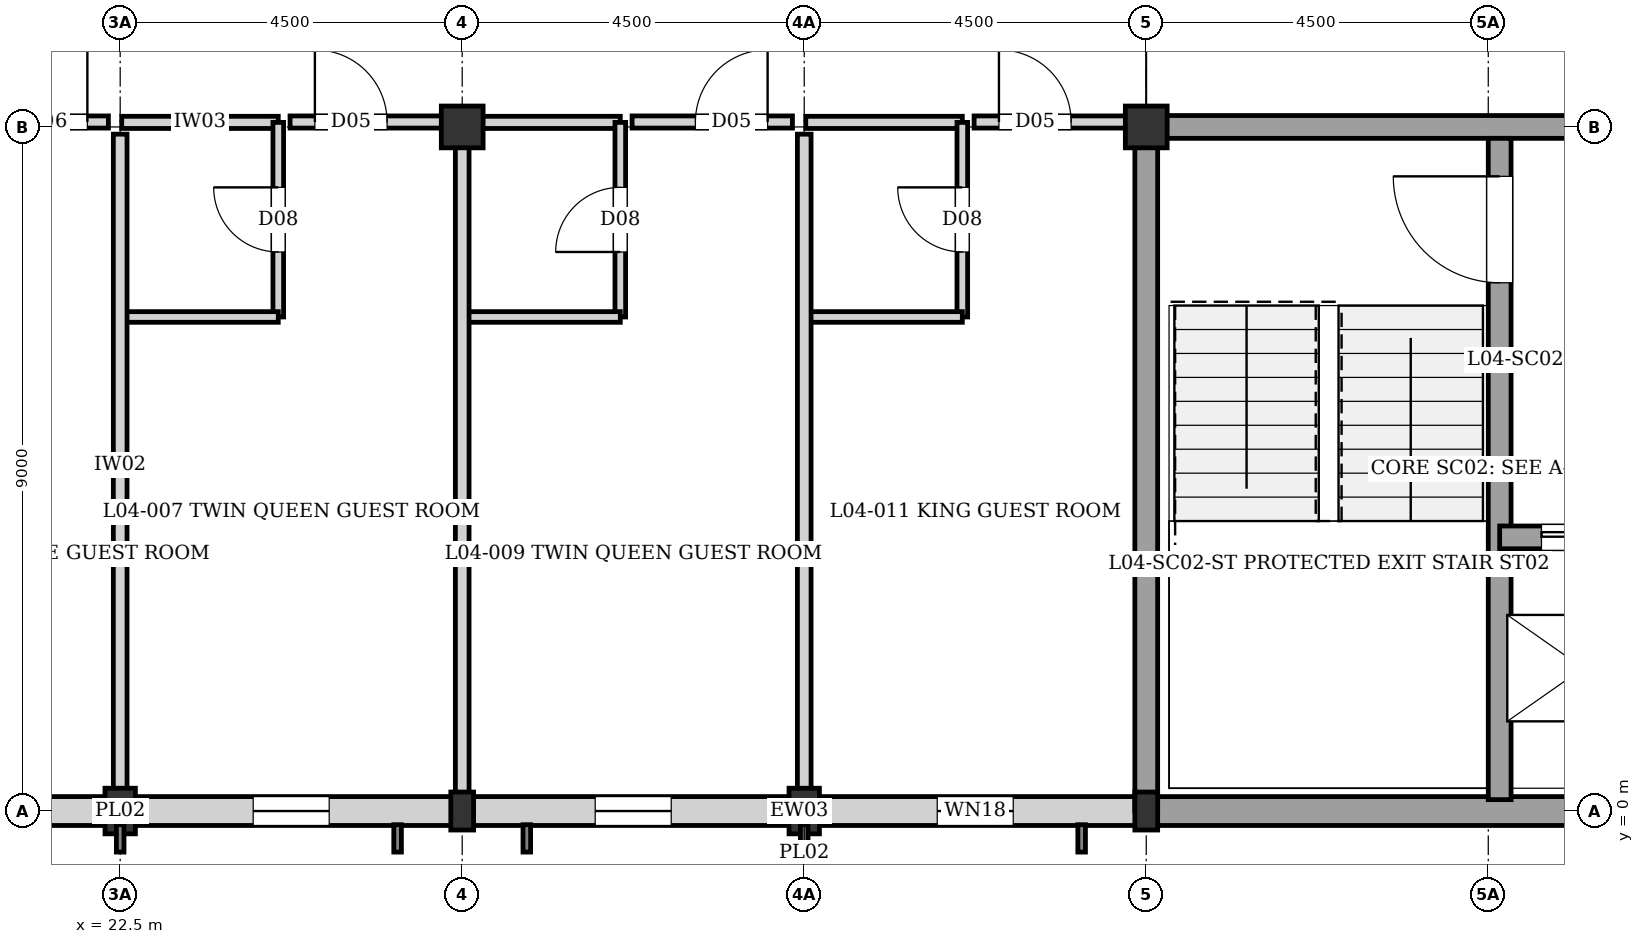
"""IFC4 building model, lengths in metres.
Left out: names, types, materials, properties, quantities, classifications, styles, units other than length and angle.
Written with IfcOpenShell. Run it as: python <this file> out.ifc"""

import sys

from ifc_helpers import new_model, si_unit, direction, frame, frame_2d, origin, origin_2d, place, context, subcontext, project, spatial, rectangle, i_section, extrude, element, fill, save


model = new_model("IFC4")
c1 = context("Model", 3, precision=1e-05, world=origin(), true_north=direction((0.0, 1.0)))
c2 = subcontext(c1, "Body", "Model", "MODEL_VIEW")
j1 = project(units=[si_unit("LENGTHUNIT", "METRE"), si_unit("PLANEANGLEUNIT", "RADIAN")], contexts=[c1])
p1 = place(None, origin())
s1 = spatial("IfcSite", under=j1, at=p1, CompositionType="ELEMENT")
p2 = place(p1, origin())
s2 = spatial("IfcBuilding", under=s1, at=p2, CompositionType="ELEMENT")
p3 = place(p2, frame((0.0, 0.0, 14.56)))
s3 = spatial("IfcBuildingStorey", under=s2, at=p3, CompositionType="ELEMENT", Elevation=14.56)
p4 = place(p3, frame((27.0, 0.0, 0.0), z_axis=(0.0, 0.0, 1.0), x_axis=(1.0, 0.0, 0.0)))
e1 = element("IfcColumn", 1, at=p4, inside=s3, PredefinedType="COLUMN", context=c2, shape_type="SweptSolid", body=[
    extrude(i_section(OverallWidth=0.3, OverallDepth=0.5, WebThickness=0.014, FlangeThickness=0.028, at=origin_2d()), origin(), (0.0, 0.0, 1.0), 3.04),
])
p5 = place(p3, frame((27.0, 9.0, 0.0), z_axis=(0.0, 0.0, 1.0), x_axis=(1.0, 0.0, 0.0)))
e2 = element("IfcColumn", 2, at=p5, inside=s3, PredefinedType="COLUMN", context=c2, shape_type="SweptSolid", body=[
    extrude(rectangle(XDim=0.55, YDim=0.55, at=origin_2d()), origin(), (0.0, 0.0, 1.0), 3.04),
])
p6 = place(p3, frame((36.0, 0.0, 0.0), z_axis=(0.0, 0.0, 1.0), x_axis=(1.0, 0.0, 0.0)))
e3 = element("IfcColumn", 3, at=p6, inside=s3, PredefinedType="COLUMN", context=c2, shape_type="SweptSolid", body=[
    extrude(i_section(OverallWidth=0.3, OverallDepth=0.5, WebThickness=0.014, FlangeThickness=0.028, at=origin_2d()), origin(), (0.0, 0.0, 1.0), 3.04),
])
p7 = place(p3, frame((36.0, 9.0, 0.0), z_axis=(0.0, 0.0, 1.0), x_axis=(1.0, 0.0, 0.0)))
e4 = element("IfcColumn", 4, at=p7, inside=s3, PredefinedType="COLUMN", context=c2, shape_type="SweptSolid", body=[
    extrude(rectangle(XDim=0.55, YDim=0.55, at=origin_2d()), origin(), (0.0, 0.0, 1.0), 3.04),
])
for number, where, z_axis, x_axis in (
    (5, (22.5, 0.0, 0.0), (0.0, 0.0, 1.0), (1.0, 0.0, 0.0)),
    (6, (31.5, 0.0, 0.0), (0.0, 0.0, 1.0), (1.0, 0.0, 0.0)),
):
    element("IfcColumn", number, at=place(p3, frame(where, z_axis=z_axis, x_axis=x_axis)), inside=s3, PredefinedType="PILASTER", context=c2, shape_type="SweptSolid", body=[
        extrude(rectangle(XDim=0.4, YDim=0.6, at=origin_2d()), origin(), (0.0, 0.0, 1.0), 3.04),
    ])
p8 = place(p3, frame((45.0, 0.0, 0.0), z_axis=(0.0, 0.0, 1.0), x_axis=(-1.0, 0.0, 0.0)))
e7 = element("IfcWall", 7, at=p8, inside=s3, PredefinedType="SOLIDWALL", context=c2, shape_type="SweptSolid", body=[
    extrude(rectangle(XDim=9.0, YDim=0.38, at=frame_2d((4.5, 0.0))), origin(), (0.0, 0.0, 1.0), 2.82),
])
p9 = place(p3, frame((35.87, 0.0, 0.0), z_axis=(0.0, 0.0, 1.0), x_axis=(-1.0, 0.0, 0.0)))
e8 = element("IfcWall", 8, at=p9, inside=s3, PredefinedType="SOLIDWALL", context=c2, shape_type="SweptSolid", body=[
    extrude(rectangle(XDim=8.87, YDim=0.38, at=frame_2d((4.435, 0.0))), origin(), (0.0, 0.0, 1.0), 2.48),
])
p10 = place(p9, frame((1.62, 0.0, 0.35)))
e9 = element("IfcOpeningElement", 9, at=p10, cuts=e8, PredefinedType="OPENING", context=c2, shape_type="SweptSolid", body=[
    extrude(rectangle(XDim=1.0, YDim=1.6, at=frame_2d((0.5, 0.8))), frame((0.0, 0.2, 0.0), z_axis=(0.0, -1.0, 0.0), x_axis=(1.0, 0.0, 0.0)), (0.0, 0.0, 1.0), 0.4),
])
p11 = place(p9, frame((6.12, 0.0, 0.35)))
e10 = element("IfcOpeningElement", 10, at=p11, cuts=e8, PredefinedType="OPENING", context=c2, shape_type="SweptSolid", body=[
    extrude(rectangle(XDim=1.0, YDim=1.6, at=frame_2d((0.5, 0.8))), frame((0.0, 0.2, 0.0), z_axis=(0.0, -1.0, 0.0), x_axis=(1.0, 0.0, 0.0)), (0.0, 0.0, 1.0), 0.4),
])
p12 = place(p3, frame((27.0, 0.0, 0.0), z_axis=(0.0, 0.0, 1.0), x_axis=(-1.0, 0.0, 0.0)))
e11 = element("IfcWall", 11, at=p12, inside=s3, PredefinedType="SOLIDWALL", context=c2, shape_type="SweptSolid", body=[
    extrude(rectangle(XDim=8.87, YDim=0.38, at=frame_2d((4.435, 0.0))), origin(), (0.0, 0.0, 1.0), 2.55),
])
p13 = place(p12, frame((1.75, 0.0, 0.35)))
e12 = element("IfcOpeningElement", 12, at=p13, cuts=e11, PredefinedType="OPENING", context=c2, shape_type="SweptSolid", body=[
    extrude(rectangle(XDim=1.0, YDim=1.6, at=frame_2d((0.5, 0.8))), frame((0.0, 0.2, 0.0), z_axis=(0.0, -1.0, 0.0), x_axis=(1.0, 0.0, 0.0)), (0.0, 0.0, 1.0), 0.4),
])
p14 = place(p12, frame((6.25, 0.0, 0.35)))
e13 = element("IfcOpeningElement", 13, at=p14, cuts=e11, PredefinedType="OPENING", context=c2, shape_type="SweptSolid", body=[
    extrude(rectangle(XDim=1.0, YDim=1.6, at=frame_2d((0.5, 0.8))), frame((0.0, 0.2, 0.0), z_axis=(0.0, -1.0, 0.0), x_axis=(1.0, 0.0, 0.0)), (0.0, 0.0, 1.0), 0.4),
])
p15 = place(p3, frame((36.0, 9.0, 0.0), z_axis=(0.0, 0.0, 1.0), x_axis=(1.0, 0.0, 0.0)))
e14 = element("IfcWall", 14, at=p15, inside=s3, PredefinedType="SHEAR", context=c2, shape_type="SweptSolid", body=[
    extrude(rectangle(XDim=9.0, YDim=0.3, at=frame_2d((4.5, 0.0))), origin(), (0.0, 0.0, 1.0), 2.82),
])
p16 = place(p15, frame((5.95, 0.0, 0.0)))
e15 = element("IfcOpeningElement", 15, at=p16, cuts=e14, PredefinedType="OPENING", context=c2, shape_type="SweptSolid", body=[
    extrude(rectangle(XDim=1.6, YDim=2.1, at=frame_2d((0.8, 1.05))), frame((0.0, 0.16, 0.0), z_axis=(0.0, -1.0, 0.0), x_axis=(1.0, 0.0, 0.0)), (0.0, 0.0, 1.0), 0.32),
])
p17 = place(p3, frame((36.0, 0.0, 0.0), z_axis=(0.0, 0.0, 1.0), x_axis=(0.0, 1.0, 0.0)))
e16 = element("IfcWall", 16, at=p17, inside=s3, PredefinedType="SHEAR", context=c2, shape_type="SweptSolid", body=[
    extrude(rectangle(XDim=9.0, YDim=0.3, at=frame_2d((4.5, 0.0))), origin(), (0.0, 0.0, 1.0), 2.82),
])
p18 = place(p3, frame((40.65, 0.15, 0.0), z_axis=(0.0, 0.0, 1.0), x_axis=(0.0, 1.0, 0.0)))
e17 = element("IfcWall", 17, at=p18, inside=s3, PredefinedType="SHEAR", context=c2, shape_type="SweptSolid", body=[
    extrude(rectangle(XDim=8.7, YDim=0.3, at=frame_2d((4.35, 0.0))), origin(), (0.0, 0.0, 1.0), 2.82),
])
p19 = place(p18, frame((6.8, 0.0, 0.0)))
e18 = element("IfcOpeningElement", 18, at=p19, cuts=e17, PredefinedType="OPENING", context=c2, shape_type="SweptSolid", body=[
    extrude(rectangle(XDim=1.4, YDim=2.02, at=frame_2d((0.7, 1.01))), frame((0.0, 0.16, 0.0), z_axis=(0.0, -1.0, 0.0), x_axis=(1.0, 0.0, 0.0)), (0.0, 0.0, 1.0), 0.32),
])
p20 = place(p3, frame((40.65, 3.6, 0.0), z_axis=(0.0, 0.0, 1.0), x_axis=(1.0, 0.0, 0.0)))
e19 = element("IfcWall", 19, at=p20, inside=s3, PredefinedType="SHEAR", context=c2, shape_type="SweptSolid", body=[
    extrude(rectangle(XDim=4.2, YDim=0.3, at=frame_2d((2.1, 0.0))), origin(), (0.0, 0.0, 1.0), 2.82),
])
p21 = place(p20, frame((0.55, 0.0, 0.0)))
e20 = element("IfcOpeningElement", 20, at=p21, cuts=e19, PredefinedType="OPENING", context=c2, shape_type="SweptSolid", body=[
    extrude(rectangle(XDim=1.1, YDim=2.1, at=frame_2d((0.55, 1.05))), frame((0.0, 0.16, 0.0), z_axis=(0.0, -1.0, 0.0), x_axis=(1.0, 0.0, 0.0)), (0.0, 0.0, 1.0), 0.32),
])
p22 = place(p20, frame((2.45, 0.0, 0.0)))
e21 = element("IfcOpeningElement", 21, at=p22, cuts=e19, PredefinedType="OPENING", context=c2, shape_type="SweptSolid", body=[
    extrude(rectangle(XDim=1.2, YDim=2.2, at=frame_2d((0.6, 1.1))), frame((0.0, 0.16, 0.0), z_axis=(0.0, -1.0, 0.0), x_axis=(1.0, 0.0, 0.0)), (0.0, 0.0, 1.0), 0.32),
])
p23 = place(p3, frame((22.52, 9.06, 0.0), z_axis=(0.0, 0.0, 1.0), x_axis=(1.0, 0.0, 0.0)))
e22 = element("IfcWall", 22, at=p23, inside=s3, PredefinedType="PARTITIONING", context=c2, shape_type="SweptSolid", body=[
    extrude(rectangle(XDim=2.06, YDim=0.16, at=frame_2d((1.03, 0.0))), origin(), (0.0, 0.0, 1.0), 2.39),
])
p24 = place(p3, frame((24.58, 6.5, 0.0), z_axis=(0.0, 0.0, 1.0), x_axis=(0.0, 1.0, 0.0)))
e23 = element("IfcWall", 23, at=p24, inside=s3, PredefinedType="PLUMBINGWALL", context=c2, shape_type="SweptSolid", body=[
    extrude(rectangle(XDim=2.56, YDim=0.14, at=frame_2d((1.28, 0.0))), origin(), (0.0, 0.0, 1.0), 2.82),
])
p25 = place(p24, frame((0.855, 0.0, 0.0)))
e24 = element("IfcOpeningElement", 24, at=p25, cuts=e23, PredefinedType="OPENING", context=c2, shape_type="SweptSolid", body=[
    extrude(rectangle(XDim=0.85, YDim=2.04, at=frame_2d((0.425, 1.02))), frame((0.0, 0.08, 0.0), z_axis=(0.0, -1.0, 0.0), x_axis=(1.0, 0.0, 0.0)), (0.0, 0.0, 1.0), 0.16),
])
p26 = place(p3, frame((22.52, 6.5, 0.0), z_axis=(0.0, 0.0, 1.0), x_axis=(1.0, 0.0, 0.0)))
e25 = element("IfcWall", 25, at=p26, inside=s3, PredefinedType="PLUMBINGWALL", context=c2, shape_type="SweptSolid", body=[
    extrude(rectangle(XDim=2.06, YDim=0.14, at=frame_2d((1.03, 0.0))), origin(), (0.0, 0.0, 1.0), 2.82),
])
p27 = place(p3, frame((27.02, 9.06, 0.0), z_axis=(0.0, 0.0, 1.0), x_axis=(1.0, 0.0, 0.0)))
e26 = element("IfcWall", 26, at=p27, inside=s3, PredefinedType="PARTITIONING", context=c2, shape_type="SweptSolid", body=[
    extrude(rectangle(XDim=2.06, YDim=0.16, at=frame_2d((1.03, 0.0))), origin(), (0.0, 0.0, 1.0), 2.34),
])
p28 = place(p3, frame((29.08, 6.5, 0.0), z_axis=(0.0, 0.0, 1.0), x_axis=(0.0, 1.0, 0.0)))
e27 = element("IfcWall", 27, at=p28, inside=s3, PredefinedType="PLUMBINGWALL", context=c2, shape_type="SweptSolid", body=[
    extrude(rectangle(XDim=2.56, YDim=0.14, at=frame_2d((1.28, 0.0))), origin(), (0.0, 0.0, 1.0), 2.82),
])
p29 = place(p28, frame((0.855, 0.0, 0.0)))
e28 = element("IfcOpeningElement", 28, at=p29, cuts=e27, PredefinedType="OPENING", context=c2, shape_type="SweptSolid", body=[
    extrude(rectangle(XDim=0.85, YDim=2.04, at=frame_2d((0.425, 1.02))), frame((0.0, 0.08, 0.0), z_axis=(0.0, -1.0, 0.0), x_axis=(1.0, 0.0, 0.0)), (0.0, 0.0, 1.0), 0.16),
])
p30 = place(p3, frame((27.02, 6.5, 0.0), z_axis=(0.0, 0.0, 1.0), x_axis=(1.0, 0.0, 0.0)))
e29 = element("IfcWall", 29, at=p30, inside=s3, PredefinedType="PLUMBINGWALL", context=c2, shape_type="SweptSolid", body=[
    extrude(rectangle(XDim=2.06, YDim=0.14, at=frame_2d((1.03, 0.0))), origin(), (0.0, 0.0, 1.0), 2.82),
])
p31 = place(p3, frame((31.52, 9.06, 0.0), z_axis=(0.0, 0.0, 1.0), x_axis=(1.0, 0.0, 0.0)))
e30 = element("IfcWall", 30, at=p31, inside=s3, PredefinedType="PARTITIONING", context=c2, shape_type="SweptSolid", body=[
    extrude(rectangle(XDim=2.06, YDim=0.16, at=frame_2d((1.03, 0.0))), origin(), (0.0, 0.0, 1.0), 2.34),
])
p32 = place(p3, frame((33.58, 6.5, 0.0), z_axis=(0.0, 0.0, 1.0), x_axis=(0.0, 1.0, 0.0)))
e31 = element("IfcWall", 31, at=p32, inside=s3, PredefinedType="PLUMBINGWALL", context=c2, shape_type="SweptSolid", body=[
    extrude(rectangle(XDim=2.56, YDim=0.14, at=frame_2d((1.28, 0.0))), origin(), (0.0, 0.0, 1.0), 2.82),
])
p33 = place(p32, frame((0.855, 0.0, 0.0)))
e32 = element("IfcOpeningElement", 32, at=p33, cuts=e31, PredefinedType="OPENING", context=c2, shape_type="SweptSolid", body=[
    extrude(rectangle(XDim=0.85, YDim=2.04, at=frame_2d((0.425, 1.02))), frame((0.0, 0.08, 0.0), z_axis=(0.0, -1.0, 0.0), x_axis=(1.0, 0.0, 0.0)), (0.0, 0.0, 1.0), 0.16),
])
p34 = place(p3, frame((31.52, 6.5, 0.0), z_axis=(0.0, 0.0, 1.0), x_axis=(1.0, 0.0, 0.0)))
e33 = element("IfcWall", 33, at=p34, inside=s3, PredefinedType="PLUMBINGWALL", context=c2, shape_type="SweptSolid", body=[
    extrude(rectangle(XDim=2.06, YDim=0.14, at=frame_2d((1.03, 0.0))), origin(), (0.0, 0.0, 1.0), 2.82),
])
p35 = place(p3, frame((22.5, 0.195, 0.0), z_axis=(0.0, 0.0, 1.0), x_axis=(0.0, 1.0, 0.0)))
e34 = element("IfcWall", 34, at=p35, inside=s3, PredefinedType="PARTITIONING", context=c2, shape_type="SweptSolid", body=[
    extrude(rectangle(XDim=8.71, YDim=0.18, at=frame_2d((4.355, 0.0))), origin(), (0.0, 0.0, 1.0), 2.82),
])
p36 = place(p3, frame((27.0, 0.195, 0.0), z_axis=(0.0, 0.0, 1.0), x_axis=(0.0, 1.0, 0.0)))
e35 = element("IfcWall", 35, at=p36, inside=s3, PredefinedType="PARTITIONING", context=c2, shape_type="SweptSolid", body=[
    extrude(rectangle(XDim=8.71, YDim=0.18, at=frame_2d((4.355, 0.0))), origin(), (0.0, 0.0, 1.0), 2.39),
])
p37 = place(p3, frame((31.5, 0.195, 0.0), z_axis=(0.0, 0.0, 1.0), x_axis=(0.0, 1.0, 0.0)))
e36 = element("IfcWall", 36, at=p37, inside=s3, PredefinedType="PARTITIONING", context=c2, shape_type="SweptSolid", body=[
    extrude(rectangle(XDim=8.71, YDim=0.18, at=frame_2d((4.355, 0.0))), origin(), (0.0, 0.0, 1.0), 2.82),
])
p38 = place(p3, frame((20.235, 9.065, 0.0), z_axis=(0.0, 0.0, 1.0), x_axis=(1.0, 0.0, 0.0)))
e37 = element("IfcWall", 37, at=p38, inside=s3, PredefinedType="PARTITIONING", context=c2, shape_type="SweptSolid", body=[
    extrude(rectangle(XDim=2.11, YDim=0.16, at=frame_2d((1.055, 0.0))), origin(), (0.0, 0.0, 1.0), 2.39),
])
p39 = place(p38, frame((0.783, 0.0, 0.0)))
e38 = element("IfcOpeningElement", 38, at=p39, cuts=e37, PredefinedType="OPENING", context=c2, shape_type="SweptSolid", body=[
    extrude(rectangle(XDim=1.05, YDim=2.15, at=frame_2d((0.525, 1.075))), frame((0.0, 0.09, 0.0), z_axis=(0.0, -1.0, 0.0), x_axis=(1.0, 0.0, 0.0)), (0.0, 0.0, 1.0), 0.18),
])
p40 = place(p3, frame((24.735, 9.065, 0.0), z_axis=(0.0, 0.0, 1.0), x_axis=(1.0, 0.0, 0.0)))
e39 = element("IfcWall", 39, at=p40, inside=s3, PredefinedType="PARTITIONING", context=c2, shape_type="SweptSolid", body=[
    extrude(rectangle(XDim=2.11, YDim=0.16, at=frame_2d((1.055, 0.0))), origin(), (0.0, 0.0, 1.0), 2.39),
])
p41 = place(p40, frame((0.327, 0.0, 0.0)))
e40 = element("IfcOpeningElement", 40, at=p41, cuts=e39, PredefinedType="OPENING", context=c2, shape_type="SweptSolid", body=[
    extrude(rectangle(XDim=0.95, YDim=2.15, at=frame_2d((0.475, 1.075))), frame((0.0, 0.09, 0.0), z_axis=(0.0, -1.0, 0.0), x_axis=(1.0, 0.0, 0.0)), (0.0, 0.0, 1.0), 0.18),
])
p42 = place(p3, frame((29.235, 9.065, 0.0), z_axis=(0.0, 0.0, 1.0), x_axis=(1.0, 0.0, 0.0)))
e41 = element("IfcWall", 41, at=p42, inside=s3, PredefinedType="PARTITIONING", context=c2, shape_type="SweptSolid", body=[
    extrude(rectangle(XDim=2.11, YDim=0.16, at=frame_2d((1.055, 0.0))), origin(), (0.0, 0.0, 1.0), 2.34),
])
p43 = place(p42, frame((0.833, 0.0, 0.0)))
e42 = element("IfcOpeningElement", 42, at=p43, cuts=e41, PredefinedType="OPENING", context=c2, shape_type="SweptSolid", body=[
    extrude(rectangle(XDim=0.95, YDim=2.15, at=frame_2d((0.475, 1.075))), frame((0.0, 0.09, 0.0), z_axis=(0.0, -1.0, 0.0), x_axis=(1.0, 0.0, 0.0)), (0.0, 0.0, 1.0), 0.18),
])
p44 = place(p3, frame((33.735, 9.065, 0.0), z_axis=(0.0, 0.0, 1.0), x_axis=(1.0, 0.0, 0.0)))
e43 = element("IfcWall", 43, at=p44, inside=s3, PredefinedType="PARTITIONING", context=c2, shape_type="SweptSolid", body=[
    extrude(rectangle(XDim=2.11, YDim=0.16, at=frame_2d((1.055, 0.0))), origin(), (0.0, 0.0, 1.0), 2.34),
])
p45 = place(p44, frame((0.327, 0.0, 0.0)))
e44 = element("IfcOpeningElement", 44, at=p45, cuts=e43, PredefinedType="OPENING", context=c2, shape_type="SweptSolid", body=[
    extrude(rectangle(XDim=0.95, YDim=2.15, at=frame_2d((0.475, 1.075))), frame((0.0, 0.09, 0.0), z_axis=(0.0, -1.0, 0.0), x_axis=(1.0, 0.0, 0.0)), (0.0, 0.0, 1.0), 0.18),
])
p46 = place(p10, origin())
e45 = element("IfcWindow", 45, at=p46, inside=s3, PartitioningType="SINGLE_PANEL", PredefinedType="WINDOW", context=c2, shape_type="SweptSolid", body=[
    extrude(rectangle(XDim=1.0, YDim=1.6, at=frame_2d((0.5, 0.8))), frame((0.0, 0.03, 0.0), z_axis=(0.0, -1.0, 0.0), x_axis=(1.0, 0.0, 0.0)), (0.0, 0.0, 1.0), 0.06),
])
fill(e9, e45)
p47 = place(p11, origin())
e46 = element("IfcWindow", 46, at=p47, inside=s3, PartitioningType="SINGLE_PANEL", PredefinedType="WINDOW", context=c2, shape_type="SweptSolid", body=[
    extrude(rectangle(XDim=1.0, YDim=1.6, at=frame_2d((0.5, 0.8))), frame((0.0, 0.03, 0.0), z_axis=(0.0, -1.0, 0.0), x_axis=(1.0, 0.0, 0.0)), (0.0, 0.0, 1.0), 0.06),
])
fill(e10, e46)
p48 = place(p13, origin())
e47 = element("IfcWindow", 47, at=p48, inside=s3, PartitioningType="SINGLE_PANEL", PredefinedType="WINDOW", context=c2, shape_type="SweptSolid", body=[
    extrude(rectangle(XDim=1.0, YDim=1.6, at=frame_2d((0.5, 0.8))), frame((0.0, 0.03, 0.0), z_axis=(0.0, -1.0, 0.0), x_axis=(1.0, 0.0, 0.0)), (0.0, 0.0, 1.0), 0.06),
])
fill(e12, e47)
p49 = place(p19, origin())
e48 = element("IfcDoor", 48, at=p49, inside=s3, OperationType="SINGLE_SWING_RIGHT", PredefinedType="DOOR", context=c2, shape_type="SweptSolid", body=[
    extrude(rectangle(XDim=1.4, YDim=2.02, at=frame_2d((0.7, 1.01))), frame((0.0, 0.025, 0.0), z_axis=(0.0, -1.0, 0.0), x_axis=(1.0, 0.0, 0.0)), (0.0, 0.0, 1.0), 0.05),
])
fill(e18, e48)
p50 = place(p21, origin())
e49 = element("IfcDoor", 49, at=p50, inside=s3, OperationType="DOUBLE_DOOR_SLIDING", PredefinedType="DOOR", context=c2, shape_type="SweptSolid", body=[
    extrude(rectangle(XDim=1.1, YDim=2.1, at=frame_2d((0.55, 1.05))), frame((0.0, 0.025, 0.0), z_axis=(0.0, -1.0, 0.0), x_axis=(1.0, 0.0, 0.0)), (0.0, 0.0, 1.0), 0.05),
])
fill(e20, e49)
p51 = place(p25, origin())
e50 = element("IfcDoor", 50, at=p51, inside=s3, OperationType="SINGLE_SWING_RIGHT", PredefinedType="DOOR", context=c2, shape_type="SweptSolid", body=[
    extrude(rectangle(XDim=0.85, YDim=2.04, at=frame_2d((0.425, 1.02))), frame((0.0, 0.025, 0.0), z_axis=(0.0, -1.0, 0.0), x_axis=(1.0, 0.0, 0.0)), (0.0, 0.0, 1.0), 0.05),
])
fill(e24, e50)
p52 = place(p29, origin())
e51 = element("IfcDoor", 51, at=p52, inside=s3, OperationType="SINGLE_SWING_LEFT", PredefinedType="DOOR", context=c2, shape_type="SweptSolid", body=[
    extrude(rectangle(XDim=0.85, YDim=2.04, at=frame_2d((0.425, 1.02))), frame((0.0, 0.025, 0.0), z_axis=(0.0, -1.0, 0.0), x_axis=(1.0, 0.0, 0.0)), (0.0, 0.0, 1.0), 0.05),
])
fill(e28, e51)
p53 = place(p33, origin())
e52 = element("IfcDoor", 52, at=p53, inside=s3, OperationType="SINGLE_SWING_RIGHT", PredefinedType="DOOR", context=c2, shape_type="SweptSolid", body=[
    extrude(rectangle(XDim=0.85, YDim=2.04, at=frame_2d((0.425, 1.02))), frame((0.0, 0.025, 0.0), z_axis=(0.0, -1.0, 0.0), x_axis=(1.0, 0.0, 0.0)), (0.0, 0.0, 1.0), 0.05),
])
fill(e32, e52)
p54 = place(p39, origin())
e53 = element("IfcDoor", 53, at=p54, inside=s3, OperationType="SINGLE_SWING_RIGHT", PredefinedType="DOOR", context=c2, shape_type="SweptSolid", body=[
    extrude(rectangle(XDim=1.05, YDim=2.15, at=frame_2d((0.525, 1.075))), frame((0.0, 0.025, 0.0), z_axis=(0.0, -1.0, 0.0), x_axis=(1.0, 0.0, 0.0)), (0.0, 0.0, 1.0), 0.05),
])
fill(e38, e53)
p55 = place(p41, origin())
e54 = element("IfcDoor", 54, at=p55, inside=s3, OperationType="SINGLE_SWING_LEFT", PredefinedType="DOOR", context=c2, shape_type="SweptSolid", body=[
    extrude(rectangle(XDim=0.95, YDim=2.15, at=frame_2d((0.475, 1.075))), frame((0.0, 0.025, 0.0), z_axis=(0.0, -1.0, 0.0), x_axis=(1.0, 0.0, 0.0)), (0.0, 0.0, 1.0), 0.05),
])
fill(e40, e54)
p56 = place(p43, origin())
e55 = element("IfcDoor", 55, at=p56, inside=s3, OperationType="SINGLE_SWING_RIGHT", PredefinedType="DOOR", context=c2, shape_type="SweptSolid", body=[
    extrude(rectangle(XDim=0.95, YDim=2.15, at=frame_2d((0.475, 1.075))), frame((0.0, 0.025, 0.0), z_axis=(0.0, -1.0, 0.0), x_axis=(1.0, 0.0, 0.0)), (0.0, 0.0, 1.0), 0.05),
])
fill(e42, e55)
p57 = place(p45, origin())
e56 = element("IfcDoor", 56, at=p57, inside=s3, OperationType="SINGLE_SWING_LEFT", PredefinedType="DOOR", context=c2, shape_type="SweptSolid", body=[
    extrude(rectangle(XDim=0.95, YDim=2.15, at=frame_2d((0.475, 1.075))), frame((0.0, 0.025, 0.0), z_axis=(0.0, -1.0, 0.0), x_axis=(1.0, 0.0, 0.0)), (0.0, 0.0, 1.0), 0.05),
])
fill(e44, e56)
save(model, sys.argv[1])
